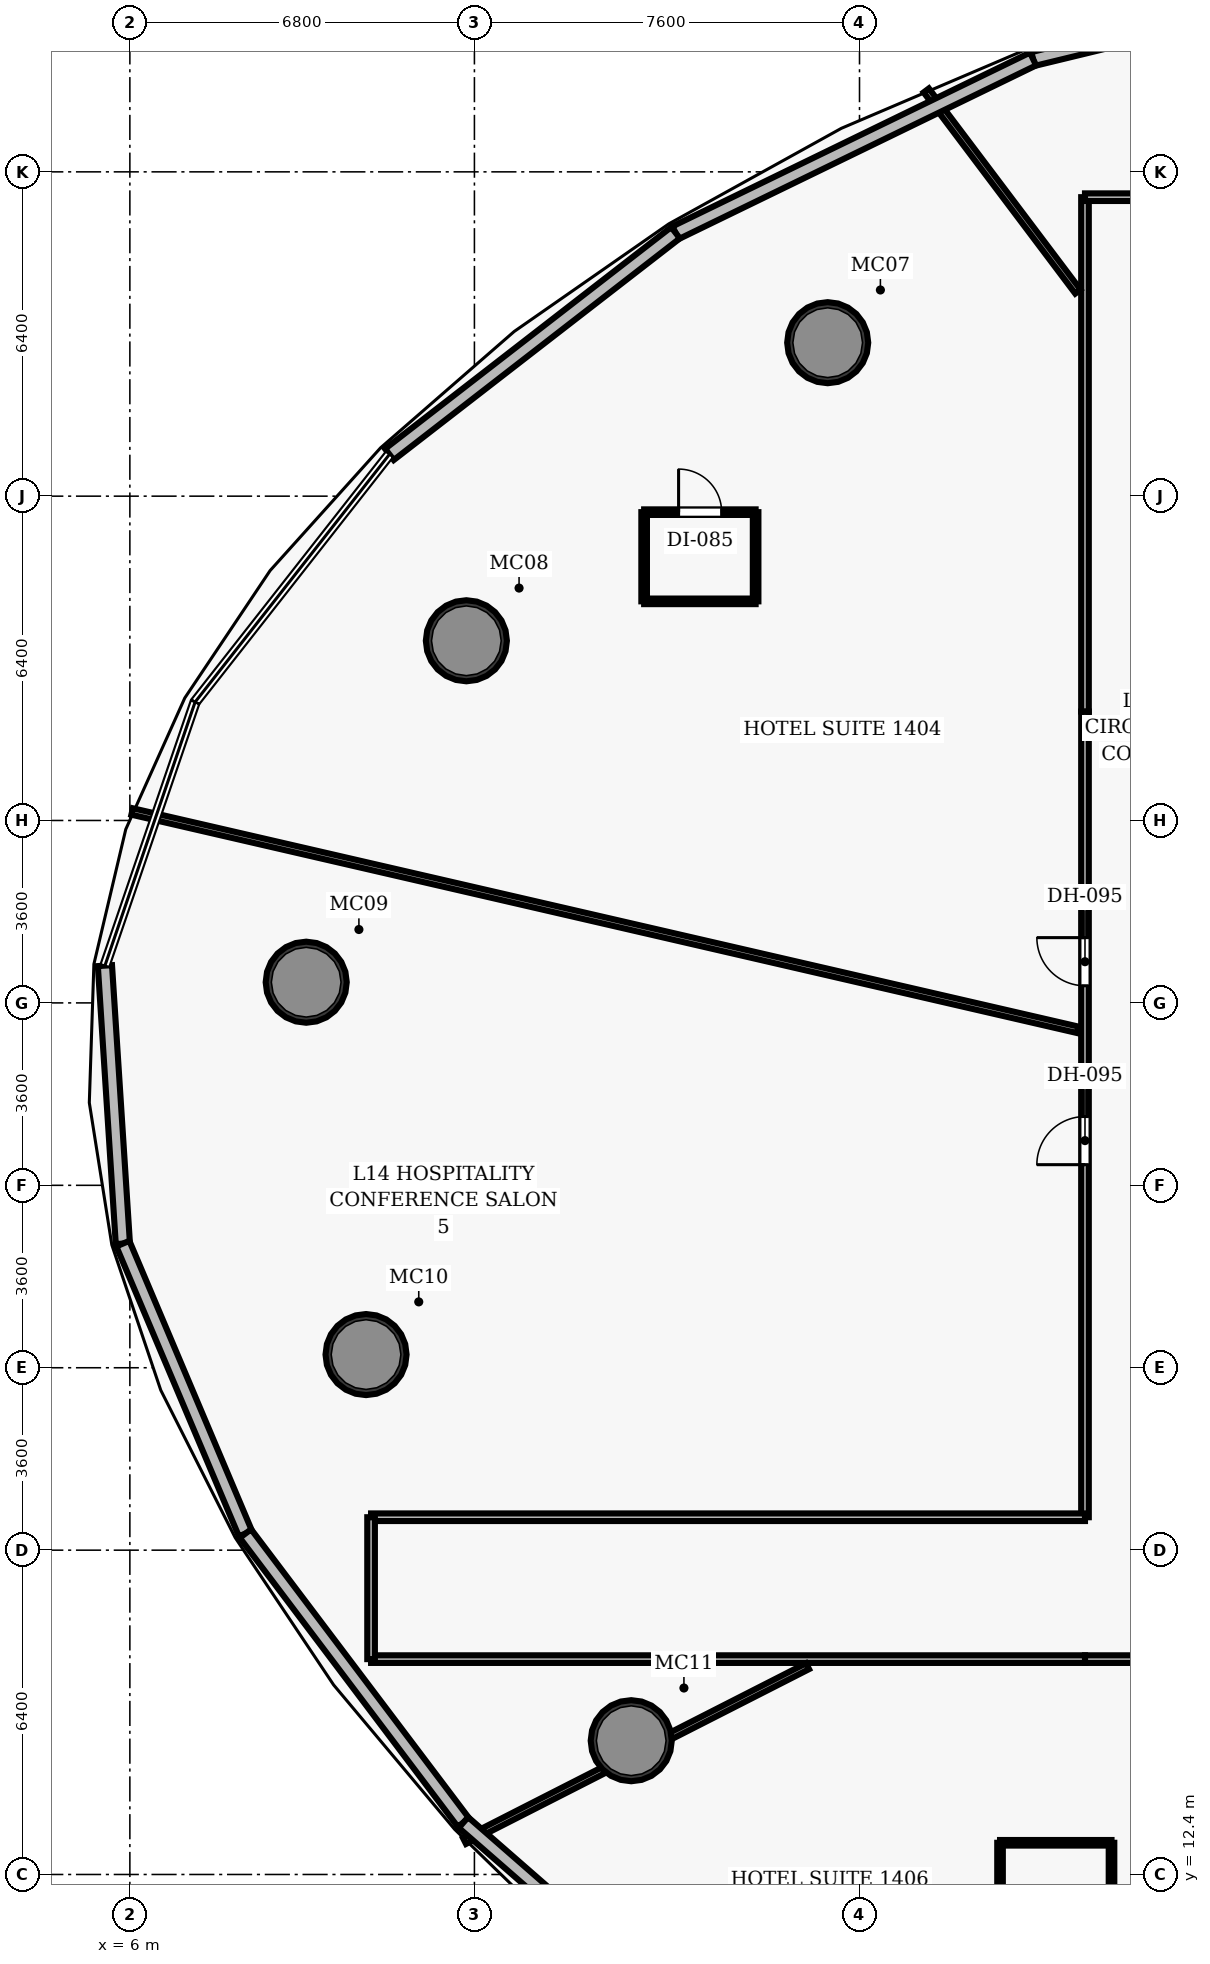
"""IFC4 building model, lengths in metres.
Left out: names, types, materials, properties, quantities, classifications, styles, units other than length and angle.
Written with IfcOpenShell. Run it as: python <this file> out.ifc"""

import sys

from ifc_helpers import new_model, si_unit, direction, frame, frame_2d, origin, origin_2d, place, context, subcontext, project, spatial, rectangle, hollow_circle, extrude, element, fill, save


model = new_model("IFC4")
c1 = context("Model", 3, precision=1e-05, world=origin(), true_north=direction((0.0, 1.0)))
c2 = subcontext(c1, "Body", "Model", "MODEL_VIEW")
j1 = project(units=[si_unit("LENGTHUNIT", "METRE"), si_unit("PLANEANGLEUNIT", "RADIAN")], contexts=[c1])
p1 = place(None, origin())
s1 = spatial("IfcSite", under=j1, at=p1, CompositionType="ELEMENT")
p2 = place(p1, origin())
s2 = spatial("IfcBuilding", under=s1, at=p2, CompositionType="ELEMENT")
p3 = place(p2, frame((0.0, 0.0, 65.9)))
s3 = spatial("IfcBuildingStorey", under=s2, at=p3, CompositionType="ELEMENT", Elevation=65.9)
for number, where, z_axis, x_axis in (
    (1, (19.772, 42.629, 0.0), (0.0, 0.0, 1.0), (1.0, 0.0, 0.0)),
    (2, (12.641, 36.746, 0.0), (0.0, 0.0, 1.0), (1.0, 0.0, 0.0)),
    (3, (9.48, 30.008, 0.0), (0.0, 0.0, 1.0), (1.0, 0.0, 0.0)),
    (4, (10.661, 22.66, 0.0), (0.0, 0.0, 1.0), (1.0, 0.0, 0.0)),
    (5, (15.895, 15.04, 0.0), (0.0, 0.0, 1.0), (1.0, 0.0, 0.0)),
):
    element("IfcColumn", number, at=place(p3, frame(where, z_axis=z_axis, x_axis=x_axis)), inside=s3, PredefinedType="COLUMN", context=c2, shape_type="SweptSolid", body=[
        extrude(hollow_circle(Radius=0.8, WallThickness=0.06, at=origin_2d()), origin(), (0.0, 0.0, 1.0), 3.5),
    ])
p4 = place(p3, frame((24.85, 16.65, 0.0), z_axis=(0.0, 0.0, 1.0), x_axis=(1.0, 0.0, 0.0)))
e6 = element("IfcWall", 6, at=p4, inside=s3, PredefinedType="PARTITIONING", context=c2, shape_type="SweptSolid", body=[
    extrude(rectangle(XDim=23.5, YDim=0.15, at=frame_2d((11.75, 0.0))), origin(), (0.0, 0.0, 1.0), 2.6),
])
p5 = place(p4, frame((6.595, 0.0, 0.0)))
e7 = element("IfcOpeningElement", 7, at=p5, cuts=e6, PredefinedType="OPENING", context=c2, shape_type="SweptSolid", body=[
    extrude(rectangle(XDim=0.95, YDim=2.15, at=frame_2d((0.475, 1.075))), frame((0.0, 0.085, 0.0), z_axis=(0.0, -1.0, 0.0), x_axis=(1.0, 0.0, 0.0)), (0.0, 0.0, 1.0), 0.17),
])
p6 = place(p4, frame((13.99, 0.0, 0.0)))
e8 = element("IfcOpeningElement", 8, at=p6, cuts=e6, PredefinedType="OPENING", context=c2, shape_type="SweptSolid", body=[
    extrude(rectangle(XDim=0.95, YDim=2.15, at=frame_2d((0.475, 1.075))), frame((0.0, 0.085, 0.0), z_axis=(0.0, -1.0, 0.0), x_axis=(1.0, 0.0, 0.0)), (0.0, 0.0, 1.0), 0.17),
])
p7 = place(p4, frame((17.211, 0.0, 0.0)))
e9 = element("IfcOpeningElement", 9, at=p7, cuts=e6, PredefinedType="OPENING", context=c2, shape_type="SweptSolid", body=[
    extrude(rectangle(XDim=0.95, YDim=2.15, at=frame_2d((0.475, 1.075))), frame((0.0, 0.085, 0.0), z_axis=(0.0, -1.0, 0.0), x_axis=(1.0, 0.0, 0.0)), (0.0, 0.0, 1.0), 0.17),
])
p8 = place(p3, frame((24.85, 19.45, 0.0), z_axis=(0.0, 0.0, 1.0), x_axis=(0.0, 1.0, 0.0)))
e10 = element("IfcWall", 10, at=p8, inside=s3, PredefinedType="PARTITIONING", context=c2, shape_type="SweptSolid", body=[
    extrude(rectangle(XDim=15.9, YDim=0.15, at=frame_2d((7.95, 0.0))), origin(), (0.0, 0.0, 1.0), 2.6),
])
p9 = place(p8, frame((10.488, 0.0, 0.0)))
e11 = element("IfcOpeningElement", 11, at=p9, cuts=e10, PredefinedType="OPENING", context=c2, shape_type="SweptSolid", body=[
    extrude(rectangle(XDim=0.95, YDim=2.15, at=frame_2d((0.475, 1.075))), frame((0.0, 0.085, 0.0), z_axis=(0.0, -1.0, 0.0), x_axis=(1.0, 0.0, 0.0)), (0.0, 0.0, 1.0), 0.17),
])
p10 = place(p8, frame((6.958, 0.0, 0.0)))
e12 = element("IfcOpeningElement", 12, at=p10, cuts=e10, PredefinedType="OPENING", context=c2, shape_type="SweptSolid", body=[
    extrude(rectangle(XDim=0.95, YDim=2.15, at=frame_2d((0.475, 1.075))), frame((0.0, 0.085, 0.0), z_axis=(0.0, -1.0, 0.0), x_axis=(1.0, 0.0, 0.0)), (0.0, 0.0, 1.0), 0.17),
])
for number, where, z_axis, x_axis in (
    (13, (10.76, 19.45, 0.0), (0.0, 0.0, 1.0), (1.0, 0.0, 0.0)),
    (14, (10.76, 16.65, 0.0), (0.0, 0.0, 1.0), (1.0, 0.0, 0.0)),
):
    element("IfcWall", number, at=place(p3, frame(where, z_axis=z_axis, x_axis=x_axis)), inside=s3, PredefinedType="PARTITIONING", context=c2, shape_type="SweptSolid", body=[
        extrude(rectangle(XDim=14.09, YDim=0.15, at=frame_2d((7.045, 0.0))), origin(), (0.0, 0.0, 1.0), 2.6),
    ])
p11 = place(p3, frame((10.76, 16.65, 0.0), z_axis=(0.0, 0.0, 1.0), x_axis=(0.0, 1.0, 0.0)))
e15 = element("IfcWall", 15, at=p11, inside=s3, PredefinedType="PARTITIONING", context=c2, shape_type="SweptSolid", body=[
    extrude(rectangle(XDim=2.8, YDim=0.15, at=frame_2d((1.4, 0.0))), origin(), (0.0, 0.0, 1.0), 2.6),
])
p12 = place(p3, frame((24.85, 35.35, 0.0), z_axis=(0.0, 0.0, 1.0), x_axis=(0.0, 1.0, 0.0)))
e16 = element("IfcWall", 16, at=p12, inside=s3, PredefinedType="PARTITIONING", context=c2, shape_type="SweptSolid", body=[
    extrude(rectangle(XDim=10.15, YDim=0.15, at=frame_2d((5.075, 0.0))), origin(), (0.0, 0.0, 1.0), 2.6),
])
p13 = place(p3, frame((24.85, 45.5, 0.0), z_axis=(0.0, 0.0, 1.0), x_axis=(1.0, 0.0, 0.0)))
e17 = element("IfcWall", 17, at=p13, inside=s3, PredefinedType="PARTITIONING", context=c2, shape_type="SweptSolid", body=[
    extrude(rectangle(XDim=2.8, YDim=0.15, at=frame_2d((1.4, 0.0))), origin(), (0.0, 0.0, 1.0), 2.6),
])
p14 = place(p3, frame((24.71, 43.636, 0.0), z_axis=(0.0, 0.0, 1.0), x_axis=(-0.601797590432, 0.798648646245, 0.0)))
e18 = element("IfcWall", 18, at=p14, inside=s3, PredefinedType="PARTITIONING", context=c2, shape_type="SweptSolid", body=[
    extrude(rectangle(XDim=4.972, YDim=0.13, at=frame_2d((2.486, 0.0))), origin(), (0.0, 0.0, 1.0), 2.6),
])
p15 = place(p3, frame((24.71, 29.068, 0.0), z_axis=(0.0, 0.0, 1.0), x_axis=(-0.97436820694, 0.224959101406, 0.0)))
e19 = element("IfcWall", 19, at=p15, inside=s3, PredefinedType="PARTITIONING", context=c2, shape_type="SweptSolid", body=[
    extrude(rectangle(XDim=19.156, YDim=0.13, at=frame_2d((9.578, 0.0))), origin(), (0.0, 0.0, 1.0), 2.6),
])
p16 = place(p3, frame((19.375, 16.51, 0.0), z_axis=(0.0, 0.0, 1.0), x_axis=(-0.891001978336, -0.453999421366, 0.0)))
e20 = element("IfcWall", 20, at=p16, inside=s3, PredefinedType="PARTITIONING", context=c2, shape_type="SweptSolid", body=[
    extrude(rectangle(XDim=7.598, YDim=0.13, at=frame_2d((3.799, 0.0))), origin(), (0.0, 0.0, 1.0), 2.6),
])
p17 = place(p3, frame((16.15, 37.524, 0.0), z_axis=(0.0, 0.0, 1.0), x_axis=(1.0, 0.0, 0.0)))
e21 = element("IfcWall", 21, at=p17, inside=s3, PredefinedType="PARTITIONING", context=c2, shape_type="SweptSolid", body=[
    extrude(rectangle(XDim=2.2, YDim=0.11, at=frame_2d((1.1, 0.0))), origin(), (0.0, 0.0, 1.0), 2.6),
])
p18 = place(p3, frame((16.15, 39.284, 0.0), z_axis=(0.0, 0.0, 1.0), x_axis=(1.0, 0.0, 0.0)))
e22 = element("IfcWall", 22, at=p18, inside=s3, PredefinedType="PARTITIONING", context=c2, shape_type="SweptSolid", body=[
    extrude(rectangle(XDim=2.2, YDim=0.11, at=frame_2d((1.1, 0.0))), origin(), (0.0, 0.0, 1.0), 2.6),
])
p19 = place(p18, frame((0.68, 0.0, 0.0)))
e23 = element("IfcOpeningElement", 23, at=p19, cuts=e22, PredefinedType="OPENING", context=c2, shape_type="SweptSolid", body=[
    extrude(rectangle(XDim=0.85, YDim=2.1, at=frame_2d((0.425, 1.05))), frame((0.0, 0.065, 0.0), z_axis=(0.0, -1.0, 0.0), x_axis=(1.0, 0.0, 0.0)), (0.0, 0.0, 1.0), 0.13),
])
for number, where, z_axis, x_axis in (
    (24, (16.15, 37.524, 0.0), (0.0, 0.0, 1.0), (0.0, 1.0, 0.0)),
    (25, (18.35, 37.524, 0.0), (0.0, 0.0, 1.0), (0.0, 1.0, 0.0)),
):
    element("IfcWall", number, at=place(p3, frame(where, z_axis=z_axis, x_axis=x_axis)), inside=s3, PredefinedType="PARTITIONING", context=c2, shape_type="SweptSolid", body=[
        extrude(rectangle(XDim=1.76, YDim=0.11, at=frame_2d((0.88, 0.0))), origin(), (0.0, 0.0, 1.0), 2.6),
    ])
p20 = place(p3, frame((23.174, 13.025, 0.0), z_axis=(0.0, 0.0, 1.0), x_axis=(1.0, 0.0, 0.0)))
e26 = element("IfcWall", 26, at=p20, inside=s3, PredefinedType="PARTITIONING", context=c2, shape_type="SweptSolid", body=[
    extrude(rectangle(XDim=2.2, YDim=0.11, at=frame_2d((1.1, 0.0))), origin(), (0.0, 0.0, 1.0), 2.6),
])
for number, where, z_axis, x_axis in (
    (27, (23.174, 11.265, 0.0), (0.0, 0.0, 1.0), (0.0, 1.0, 0.0)),
    (28, (25.374, 11.265, 0.0), (0.0, 0.0, 1.0), (0.0, 1.0, 0.0)),
):
    element("IfcWall", number, at=place(p3, frame(where, z_axis=z_axis, x_axis=x_axis)), inside=s3, PredefinedType="PARTITIONING", context=c2, shape_type="SweptSolid", body=[
        extrude(rectangle(XDim=1.76, YDim=0.11, at=frame_2d((0.88, 0.0))), origin(), (0.0, 0.0, 1.0), 2.6),
    ])
p21 = place(p3, frame((23.825, 48.227, 0.0), z_axis=(0.0, 0.0, 1.0), x_axis=(0.971850727629, 0.235597460104, 0.0)))
e29 = element("IfcWall", 29, at=p21, inside=s3, PredefinedType="SOLIDWALL", context=c2, shape_type="SweptSolid", body=[
    extrude(rectangle(XDim=8.171, YDim=0.28, at=frame_2d((4.085, 0.0))), origin(), (0.0, 0.0, 1.0), 3.25),
])
p22 = place(p3, frame((16.769, 44.798, 0.0), z_axis=(0.0, 0.0, 1.0), x_axis=(0.899430218245, 0.437064391718, 0.0)))
e30 = element("IfcWall", 30, at=p22, inside=s3, PredefinedType="SOLIDWALL", context=c2, shape_type="SweptSolid", body=[
    extrude(rectangle(XDim=7.845, YDim=0.28, at=frame_2d((3.922, 0.0))), origin(), (0.0, 0.0, 1.0), 3.25),
])
p23 = place(p3, frame((11.123, 40.424, 0.0), z_axis=(0.0, 0.0, 1.0), x_axis=(0.790547015507, 0.612401352278, 0.0)))
e31 = element("IfcWall", 31, at=p23, inside=s3, PredefinedType="SOLIDWALL", context=c2, shape_type="SweptSolid", body=[
    extrude(rectangle(XDim=7.143, YDim=0.28, at=frame_2d((3.571, 0.0))), origin(), (0.0, 0.0, 1.0), 3.25),
])
p24 = place(p3, frame((5.862, 24.849, 0.0), z_axis=(0.0, 0.0, 1.0), x_axis=(-0.064305239639, 0.997930276199, 0.0)))
e32 = element("IfcWall", 32, at=p24, inside=s3, PredefinedType="SOLIDWALL", context=c2, shape_type="SweptSolid", body=[
    extrude(rectangle(XDim=5.498, YDim=0.28, at=frame_2d((2.749, 0.0))), origin(), (0.0, 0.0, 1.0), 3.25),
])
p25 = place(p3, frame((8.281, 19.128, 0.0), z_axis=(0.0, 0.0, 1.0), x_axis=(-0.38946562283, 0.921041002689, 0.0)))
e33 = element("IfcWall", 33, at=p25, inside=s3, PredefinedType="SOLIDWALL", context=c2, shape_type="SweptSolid", body=[
    extrude(rectangle(XDim=6.212, YDim=0.28, at=frame_2d((3.106, 0.0))), origin(), (0.0, 0.0, 1.0), 3.25),
])
p26 = place(p3, frame((12.583, 13.426, 0.0), z_axis=(0.0, 0.0, 1.0), x_axis=(-0.602327192547, 0.798249305116, 0.0)))
e34 = element("IfcWall", 34, at=p26, inside=s3, PredefinedType="SOLIDWALL", context=c2, shape_type="SweptSolid", body=[
    extrude(rectangle(XDim=7.143, YDim=0.28, at=frame_2d((3.571, 0.0))), origin(), (0.0, 0.0, 1.0), 3.25),
])
p27 = place(p3, frame((18.493, 8.267, 0.0), z_axis=(0.0, 0.0, 1.0), x_axis=(-0.753362705376, 0.657605226673, 0.0)))
e35 = element("IfcWall", 35, at=p27, inside=s3, PredefinedType="SOLIDWALL", context=c2, shape_type="SweptSolid", body=[
    extrude(rectangle(XDim=7.845, YDim=0.28, at=frame_2d((3.922, 0.0))), origin(), (0.0, 0.0, 1.0), 3.25),
])
p28 = place(p9, origin())
e36 = element("IfcDoor", 36, at=p28, inside=s3, OperationType="SINGLE_SWING_RIGHT", PredefinedType="DOOR", context=c2, shape_type="SweptSolid", body=[
    extrude(rectangle(XDim=0.95, YDim=2.15, at=frame_2d((0.475, 1.075))), frame((0.0, 0.025, 0.0), z_axis=(0.0, -1.0, 0.0), x_axis=(1.0, 0.0, 0.0)), (0.0, 0.0, 1.0), 0.05),
])
fill(e11, e36)
p29 = place(p19, origin())
e37 = element("IfcDoor", 37, at=p29, inside=s3, OperationType="SINGLE_SWING_LEFT", PredefinedType="DOOR", context=c2, shape_type="SweptSolid", body=[
    extrude(rectangle(XDim=0.85, YDim=2.1, at=frame_2d((0.425, 1.05))), frame((0.0, 0.025, 0.0), z_axis=(0.0, -1.0, 0.0), x_axis=(1.0, 0.0, 0.0)), (0.0, 0.0, 1.0), 0.05),
])
fill(e23, e37)
p30 = place(p10, origin())
e38 = element("IfcDoor", 38, at=p30, inside=s3, OperationType="SINGLE_SWING_LEFT", PredefinedType="DOOR", context=c2, shape_type="SweptSolid", body=[
    extrude(rectangle(XDim=0.95, YDim=2.15, at=frame_2d((0.475, 1.075))), frame((0.0, 0.025, 0.0), z_axis=(0.0, -1.0, 0.0), x_axis=(1.0, 0.0, 0.0)), (0.0, 0.0, 1.0), 0.05),
])
fill(e12, e38)
save(model, sys.argv[1])
